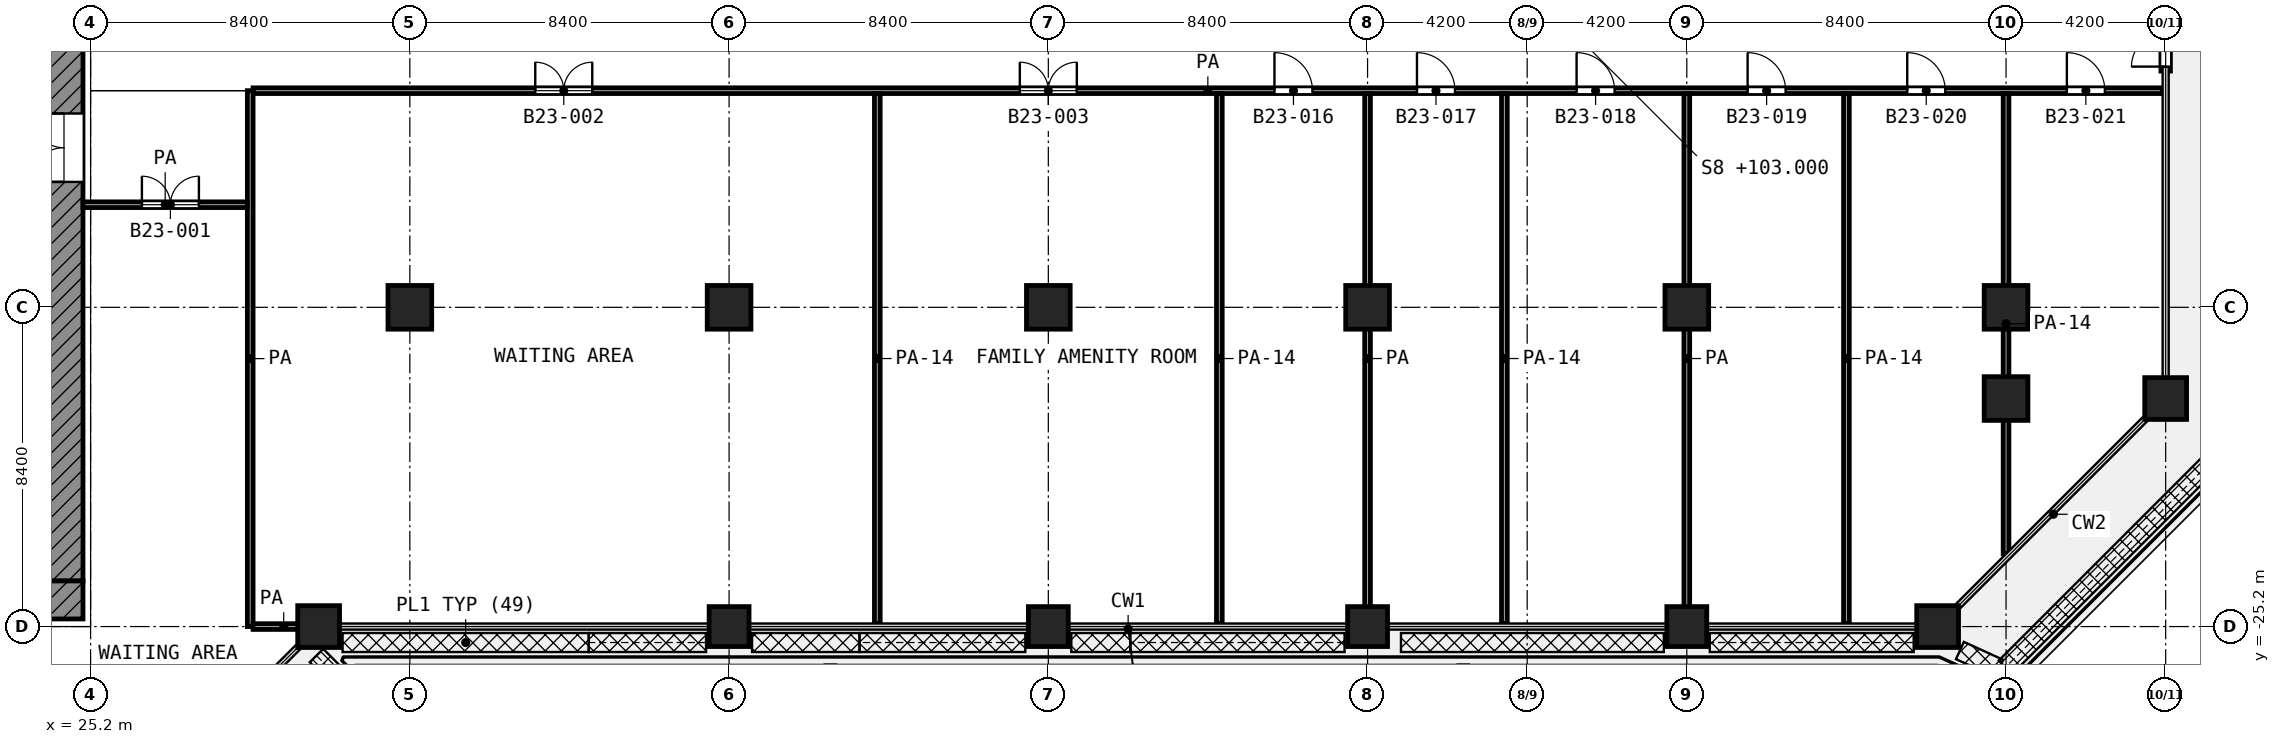
"""IFC4 building model, lengths in metres.
Left out: names, types, materials, properties, quantities, classifications, styles, units other than length and angle.
Written with IfcOpenShell. Run it as: python <this file> out.ifc"""

import sys

from ifc_helpers import new_model, si_unit, direction, frame, frame_2d, origin, origin_2d, place, context, subcontext, project, spatial, rectangle, extrude, element, fill, save


model = new_model("IFC4")
c1 = context("Model", 3, precision=1e-05, world=origin(), true_north=direction((0.0, 1.0)))
c2 = subcontext(c1, "Body", "Model", "MODEL_VIEW")
j1 = project(units=[si_unit("LENGTHUNIT", "METRE"), si_unit("PLANEANGLEUNIT", "RADIAN")], contexts=[c1])
p1 = place(None, origin())
s1 = spatial("IfcSite", under=j1, at=p1, CompositionType="ELEMENT")
p2 = place(p1, origin())
s2 = spatial("IfcBuilding", under=s1, at=p2, CompositionType="ELEMENT")
p3 = place(p2, frame((0.0, 0.0, 103.0)))
s3 = spatial("IfcBuildingStorey", under=s2, at=p3, CompositionType="ELEMENT", Elevation=103.0)
for number, where, z_axis, x_axis in (
    (1, (33.6, -16.8, 0.0), (0.0, 0.0, 1.0), (1.0, 0.0, 0.0)),
    (2, (42.0, -16.8, 0.0), (0.0, 0.0, 1.0), (1.0, 0.0, 0.0)),
    (3, (50.4, -16.8, 0.0), (0.0, 0.0, 1.0), (1.0, 0.0, 0.0)),
    (4, (58.8, -16.8, 0.0), (0.0, 0.0, 1.0), (1.0, 0.0, 0.0)),
    (5, (67.2, -16.8, 0.0), (0.0, 0.0, 1.0), (1.0, 0.0, 0.0)),
    (6, (75.6, -16.8, 0.0), (0.0, 0.0, 1.0), (1.0, 0.0, 0.0)),
    (7, (75.6, -19.2, 0.0), (0.0, 0.0, 1.0), (1.0, 0.0, 0.0)),
):
    element("IfcColumn", number, at=place(p3, frame(where, z_axis=z_axis, x_axis=x_axis)), inside=s3, PredefinedType="COLUMN", context=c2, shape_type="SweptSolid", body=[
        extrude(rectangle(XDim=1.15, YDim=1.15, at=origin_2d()), origin(), (0.0, 0.0, 1.0), 4.2),
    ])
for number, where, z_axis, x_axis in (
    (8, (79.8, -19.2, 0.0), (0.0, 0.0, 1.0), (1.0, 0.0, 0.0)),
    (9, (31.2, -25.2, 0.0), (0.0, 0.0, 1.0), (1.0, 0.0, 0.0)),
):
    element("IfcColumn", number, at=place(p3, frame(where, z_axis=z_axis, x_axis=x_axis)), inside=s3, PredefinedType="COLUMN", context=c2, shape_type="SweptSolid", body=[
        extrude(rectangle(XDim=1.1, YDim=1.1, at=origin_2d()), origin(), (0.0, 0.0, 1.0), 4.2),
    ])
for number, where, z_axis, x_axis in (
    (10, (42.0, -25.2, 0.0), (0.0, 0.0, 1.0), (1.0, 0.0, 0.0)),
    (11, (50.4, -25.2, 0.0), (0.0, 0.0, 1.0), (1.0, 0.0, 0.0)),
    (12, (58.8, -25.2, 0.0), (0.0, 0.0, 1.0), (1.0, 0.0, 0.0)),
    (13, (67.2, -25.2, 0.0), (0.0, 0.0, 1.0), (1.0, 0.0, 0.0)),
):
    element("IfcColumn", number, at=place(p3, frame(where, z_axis=z_axis, x_axis=x_axis)), inside=s3, PredefinedType="COLUMN", context=c2, shape_type="SweptSolid", body=[
        extrude(rectangle(XDim=1.05, YDim=1.05, at=origin_2d()), origin(), (0.0, 0.0, 1.0), 4.2),
    ])
p4 = place(p3, frame((73.8, -25.2, 0.0), z_axis=(0.0, 0.0, 1.0), x_axis=(1.0, 0.0, 0.0)))
e14 = element("IfcColumn", 14, at=p4, inside=s3, PredefinedType="COLUMN", context=c2, shape_type="SweptSolid", body=[
    extrude(rectangle(XDim=1.1, YDim=1.1, at=origin_2d()), origin(), (0.0, 0.0, 1.0), 4.2),
])
p5 = place(p3, frame((79.8, -10.583, 0.0), z_axis=(0.0, 0.0, 1.0), x_axis=(0.0, 1.0, 0.0)))
e15 = element("IfcWall", 15, at=p5, inside=s3, PredefinedType="SOLIDWALL", context=c2, shape_type="SweptSolid", body=[
    extrude(rectangle(XDim=4.033, YDim=0.25, at=frame_2d((2.017, 0.0))), origin(), (0.0, 0.0, 1.0), 3.48),
])
p6 = place(p5, frame((0.117, 0.0, 0.0)))
e16 = element("IfcOpeningElement", 16, at=p6, cuts=e15, PredefinedType="OPENING", context=c2, shape_type="SweptSolid", body=[
    extrude(rectangle(XDim=1.8, YDim=2.1, at=frame_2d((0.9, 1.05))), frame((0.0, 0.135, 0.0), z_axis=(0.0, -1.0, 0.0), x_axis=(1.0, 0.0, 0.0)), (0.0, 0.0, 1.0), 0.27),
])
p7 = place(p3, frame((24.5, -24.0, 0.0), z_axis=(0.0, 0.0, 1.0), x_axis=(0.0, 1.0, 0.0)))
e17 = element("IfcWall", 17, at=p7, inside=s3, PredefinedType="SHEAR", context=c2, shape_type="SweptSolid", body=[
    extrude(rectangle(XDim=18.6, YDim=1.0, at=frame_2d((9.3, 0.0))), origin(), (0.0, 0.0, 1.0), 3.6),
])
p8 = place(p7, frame((10.5, 0.0, 0.0)))
e18 = element("IfcOpeningElement", 18, at=p8, cuts=e17, PredefinedType="OPENING", context=c2, shape_type="SweptSolid", body=[
    extrude(rectangle(XDim=1.8, YDim=2.1, at=frame_2d((0.9, 1.05))), frame((0.0, 0.51, 0.0), z_axis=(0.0, -1.0, 0.0), x_axis=(1.0, 0.0, 0.0)), (0.0, 0.0, 1.0), 1.02),
])
p9 = place(p3, frame((24.5, -25.0, 0.0), z_axis=(0.0, 0.0, 1.0), x_axis=(0.0, 1.0, 0.0)))
e19 = element("IfcWall", 19, at=p9, inside=s3, PredefinedType="SHEAR", context=c2, shape_type="SweptSolid", body=[
    extrude(rectangle(XDim=1.0, YDim=1.0, at=frame_2d((0.5, 0.0))), origin(), (0.0, 0.0, 1.0), 3.6),
])
p10 = place(p3, frame((29.475, -25.2, 0.0), z_axis=(0.0, 0.0, 1.0), x_axis=(1.0, 0.0, 0.0)))
e20 = element("IfcWall", 20, at=p10, inside=s3, PredefinedType="PARTITIONING", context=c2, shape_type="SweptSolid", body=[
    extrude(rectangle(XDim=1.612, YDim=0.15, at=frame_2d((0.806, 0.0))), origin(), (0.0, 0.0, 1.0), 3.6),
])
p11 = place(p3, frame((25.0, -14.1, 0.0), z_axis=(0.0, 0.0, 1.0), x_axis=(1.0, 0.0, 0.0)))
e21 = element("IfcWall", 21, at=p11, inside=s3, PredefinedType="PARTITIONING", context=c2, shape_type="SweptSolid", body=[
    extrude(rectangle(XDim=4.325, YDim=0.15, at=frame_2d((2.163, 0.0))), origin(), (0.0, 0.0, 1.0), 3.6),
])
p12 = place(p11, frame((1.55, 0.0, 0.0)))
e22 = element("IfcOpeningElement", 22, at=p12, cuts=e21, PredefinedType="OPENING", context=c2, shape_type="SweptSolid", body=[
    extrude(rectangle(XDim=1.5, YDim=2.1, at=frame_2d((0.75, 1.05))), frame((0.0, 0.085, 0.0), z_axis=(0.0, -1.0, 0.0), x_axis=(1.0, 0.0, 0.0)), (0.0, 0.0, 1.0), 0.17),
])
p13 = place(p3, frame((29.475, -11.1, 0.0), z_axis=(0.0, 0.0, 1.0), x_axis=(1.0, 0.0, 0.0)))
e23 = element("IfcWall", 23, at=p13, inside=s3, PredefinedType="PARTITIONING", context=c2, shape_type="SweptSolid", body=[
    extrude(rectangle(XDim=50.245, YDim=0.15, at=frame_2d((25.123, 0.0))), origin(), (0.0, 0.0, 1.0), 3.6),
])
p14 = place(p13, frame((7.425, 0.0, 0.0)))
e24 = element("IfcOpeningElement", 24, at=p14, cuts=e23, PredefinedType="OPENING", context=c2, shape_type="SweptSolid", body=[
    extrude(rectangle(XDim=1.5, YDim=2.1, at=frame_2d((0.75, 1.05))), frame((0.0, 0.085, 0.0), z_axis=(0.0, -1.0, 0.0), x_axis=(1.0, 0.0, 0.0)), (0.0, 0.0, 1.0), 0.17),
])
p15 = place(p13, frame((20.175, 0.0, 0.0)))
e25 = element("IfcOpeningElement", 25, at=p15, cuts=e23, PredefinedType="OPENING", context=c2, shape_type="SweptSolid", body=[
    extrude(rectangle(XDim=1.5, YDim=2.1, at=frame_2d((0.75, 1.05))), frame((0.0, 0.085, 0.0), z_axis=(0.0, -1.0, 0.0), x_axis=(1.0, 0.0, 0.0)), (0.0, 0.0, 1.0), 0.17),
])
p16 = place(p13, frame((26.875, 0.0, 0.0)))
e26 = element("IfcOpeningElement", 26, at=p16, cuts=e23, PredefinedType="OPENING", context=c2, shape_type="SweptSolid", body=[
    extrude(rectangle(XDim=1.0, YDim=2.1, at=frame_2d((0.5, 1.05))), frame((0.0, 0.085, 0.0), z_axis=(0.0, -1.0, 0.0), x_axis=(1.0, 0.0, 0.0)), (0.0, 0.0, 1.0), 0.17),
])
p17 = place(p13, frame((30.625, 0.0, 0.0)))
e27 = element("IfcOpeningElement", 27, at=p17, cuts=e23, PredefinedType="OPENING", context=c2, shape_type="SweptSolid", body=[
    extrude(rectangle(XDim=1.0, YDim=2.1, at=frame_2d((0.5, 1.05))), frame((0.0, 0.085, 0.0), z_axis=(0.0, -1.0, 0.0), x_axis=(1.0, 0.0, 0.0)), (0.0, 0.0, 1.0), 0.17),
])
p18 = place(p13, frame((34.825, 0.0, 0.0)))
e28 = element("IfcOpeningElement", 28, at=p18, cuts=e23, PredefinedType="OPENING", context=c2, shape_type="SweptSolid", body=[
    extrude(rectangle(XDim=1.0, YDim=2.1, at=frame_2d((0.5, 1.05))), frame((0.0, 0.085, 0.0), z_axis=(0.0, -1.0, 0.0), x_axis=(1.0, 0.0, 0.0)), (0.0, 0.0, 1.0), 0.17),
])
p19 = place(p13, frame((39.325, 0.0, 0.0)))
e29 = element("IfcOpeningElement", 29, at=p19, cuts=e23, PredefinedType="OPENING", context=c2, shape_type="SweptSolid", body=[
    extrude(rectangle(XDim=1.0, YDim=2.1, at=frame_2d((0.5, 1.05))), frame((0.0, 0.085, 0.0), z_axis=(0.0, -1.0, 0.0), x_axis=(1.0, 0.0, 0.0)), (0.0, 0.0, 1.0), 0.17),
])
p20 = place(p13, frame((43.525, 0.0, 0.0)))
e30 = element("IfcOpeningElement", 30, at=p20, cuts=e23, PredefinedType="OPENING", context=c2, shape_type="SweptSolid", body=[
    extrude(rectangle(XDim=1.0, YDim=2.1, at=frame_2d((0.5, 1.05))), frame((0.0, 0.085, 0.0), z_axis=(0.0, -1.0, 0.0), x_axis=(1.0, 0.0, 0.0)), (0.0, 0.0, 1.0), 0.17),
])
p21 = place(p13, frame((47.725, 0.0, 0.0)))
e31 = element("IfcOpeningElement", 31, at=p21, cuts=e23, PredefinedType="OPENING", context=c2, shape_type="SweptSolid", body=[
    extrude(rectangle(XDim=1.0, YDim=2.1, at=frame_2d((0.5, 1.05))), frame((0.0, 0.085, 0.0), z_axis=(0.0, -1.0, 0.0), x_axis=(1.0, 0.0, 0.0)), (0.0, 0.0, 1.0), 0.17),
])
p22 = place(p3, frame((29.4, -25.2, 0.0), z_axis=(0.0, 0.0, 1.0), x_axis=(0.0, 1.0, 0.0)))
e32 = element("IfcWall", 32, at=p22, inside=s3, PredefinedType="PARTITIONING", context=c2, shape_type="SweptSolid", body=[
    extrude(rectangle(XDim=14.1, YDim=0.15, at=frame_2d((7.05, 0.0))), origin(), (0.0, 0.0, 1.0), 3.6),
])
for number, where, z_axis, x_axis in (
    (33, (45.9, -25.12, 0.0), (0.0, 0.0, 1.0), (0.0, 1.0, 0.0)),
    (34, (54.9, -25.12, 0.0), (0.0, 0.0, 1.0), (0.0, 1.0, 0.0)),
):
    element("IfcWall", number, at=place(p3, frame(where, z_axis=z_axis, x_axis=x_axis)), inside=s3, PredefinedType="PARTITIONING", context=c2, shape_type="SweptSolid", body=[
        extrude(rectangle(XDim=13.945, YDim=0.15, at=frame_2d((6.973, 0.0))), origin(), (0.0, 0.0, 1.0), 2.7),
    ])
p23 = place(p3, frame((58.8, -25.12, 0.0), z_axis=(0.0, 0.0, 1.0), x_axis=(0.0, 1.0, 0.0)))
e35 = element("IfcWall", 35, at=p23, inside=s3, PredefinedType="PARTITIONING", context=c2, shape_type="SweptSolid", body=[
    extrude(rectangle(XDim=13.945, YDim=0.15, at=frame_2d((6.973, 0.0))), origin(), (0.0, 0.0, 1.0), 3.6),
])
p24 = place(p3, frame((62.4, -25.12, 0.0), z_axis=(0.0, 0.0, 1.0), x_axis=(0.0, 1.0, 0.0)))
e36 = element("IfcWall", 36, at=p24, inside=s3, PredefinedType="PARTITIONING", context=c2, shape_type="SweptSolid", body=[
    extrude(rectangle(XDim=13.945, YDim=0.15, at=frame_2d((6.973, 0.0))), origin(), (0.0, 0.0, 1.0), 2.7),
])
p25 = place(p3, frame((67.2, -25.12, 0.0), z_axis=(0.0, 0.0, 1.0), x_axis=(0.0, 1.0, 0.0)))
e37 = element("IfcWall", 37, at=p25, inside=s3, PredefinedType="PARTITIONING", context=c2, shape_type="SweptSolid", body=[
    extrude(rectangle(XDim=13.945, YDim=0.15, at=frame_2d((6.973, 0.0))), origin(), (0.0, 0.0, 1.0), 3.6),
])
p26 = place(p3, frame((71.4, -25.12, 0.0), z_axis=(0.0, 0.0, 1.0), x_axis=(0.0, 1.0, 0.0)))
e38 = element("IfcWall", 38, at=p26, inside=s3, PredefinedType="PARTITIONING", context=c2, shape_type="SweptSolid", body=[
    extrude(rectangle(XDim=13.945, YDim=0.15, at=frame_2d((6.973, 0.0))), origin(), (0.0, 0.0, 1.0), 2.7),
])
p27 = place(p3, frame((75.6, -23.287, 0.0), z_axis=(0.0, 0.0, 1.0), x_axis=(0.0, 1.0, 0.0)))
e39 = element("IfcWall", 39, at=p27, inside=s3, PredefinedType="PARTITIONING", context=c2, shape_type="SweptSolid", body=[
    extrude(rectangle(XDim=12.112, YDim=0.15, at=frame_2d((6.056, 0.0))), origin(), (0.0, 0.0, 1.0), 2.7),
])
p28 = place(p6, origin())
e40 = element("IfcDoor", 40, at=p28, inside=s3, OperationType="DOUBLE_DOOR_SINGLE_SWING", PredefinedType="DOOR", context=c2, shape_type="SweptSolid", body=[
    extrude(rectangle(XDim=1.8, YDim=2.1, at=frame_2d((0.9, 1.05))), frame((0.0, 0.025, 0.0), z_axis=(0.0, -1.0, 0.0), x_axis=(1.0, 0.0, 0.0)), (0.0, 0.0, 1.0), 0.05),
])
fill(e16, e40)
p29 = place(p8, origin())
e41 = element("IfcDoor", 41, at=p29, inside=s3, OperationType="DOUBLE_DOOR_SINGLE_SWING", PredefinedType="DOOR", context=c2, shape_type="SweptSolid", body=[
    extrude(rectangle(XDim=1.8, YDim=2.1, at=frame_2d((0.9, 1.05))), frame((0.0, 0.025, 0.0), z_axis=(0.0, -1.0, 0.0), x_axis=(1.0, 0.0, 0.0)), (0.0, 0.0, 1.0), 0.05),
])
fill(e18, e41)
p30 = place(p12, origin())
e42 = element("IfcDoor", 42, at=p30, inside=s3, OperationType="DOUBLE_DOOR_SINGLE_SWING", PredefinedType="DOOR", context=c2, shape_type="SweptSolid", body=[
    extrude(rectangle(XDim=1.5, YDim=2.1, at=frame_2d((0.75, 1.05))), frame((0.0, 0.025, 0.0), z_axis=(0.0, -1.0, 0.0), x_axis=(1.0, 0.0, 0.0)), (0.0, 0.0, 1.0), 0.05),
])
fill(e22, e42)
p31 = place(p14, origin())
e43 = element("IfcDoor", 43, at=p31, inside=s3, OperationType="DOUBLE_DOOR_SINGLE_SWING", PredefinedType="DOOR", context=c2, shape_type="SweptSolid", body=[
    extrude(rectangle(XDim=1.5, YDim=2.1, at=frame_2d((0.75, 1.05))), frame((0.0, 0.025, 0.0), z_axis=(0.0, -1.0, 0.0), x_axis=(1.0, 0.0, 0.0)), (0.0, 0.0, 1.0), 0.05),
])
fill(e24, e43)
p32 = place(p15, origin())
e44 = element("IfcDoor", 44, at=p32, inside=s3, OperationType="DOUBLE_DOOR_SINGLE_SWING", PredefinedType="DOOR", context=c2, shape_type="SweptSolid", body=[
    extrude(rectangle(XDim=1.5, YDim=2.1, at=frame_2d((0.75, 1.05))), frame((0.0, 0.025, 0.0), z_axis=(0.0, -1.0, 0.0), x_axis=(1.0, 0.0, 0.0)), (0.0, 0.0, 1.0), 0.05),
])
fill(e25, e44)
p33 = place(p16, origin())
e45 = element("IfcDoor", 45, at=p33, inside=s3, OperationType="SINGLE_SWING_LEFT", PredefinedType="DOOR", context=c2, shape_type="SweptSolid", body=[
    extrude(rectangle(XDim=1.0, YDim=2.1, at=frame_2d((0.5, 1.05))), frame((0.0, 0.025, 0.0), z_axis=(0.0, -1.0, 0.0), x_axis=(1.0, 0.0, 0.0)), (0.0, 0.0, 1.0), 0.05),
])
fill(e26, e45)
p34 = place(p17, origin())
e46 = element("IfcDoor", 46, at=p34, inside=s3, OperationType="SINGLE_SWING_LEFT", PredefinedType="DOOR", context=c2, shape_type="SweptSolid", body=[
    extrude(rectangle(XDim=1.0, YDim=2.1, at=frame_2d((0.5, 1.05))), frame((0.0, 0.025, 0.0), z_axis=(0.0, -1.0, 0.0), x_axis=(1.0, 0.0, 0.0)), (0.0, 0.0, 1.0), 0.05),
])
fill(e27, e46)
p35 = place(p18, origin())
e47 = element("IfcDoor", 47, at=p35, inside=s3, OperationType="SINGLE_SWING_LEFT", PredefinedType="DOOR", context=c2, shape_type="SweptSolid", body=[
    extrude(rectangle(XDim=1.0, YDim=2.1, at=frame_2d((0.5, 1.05))), frame((0.0, 0.025, 0.0), z_axis=(0.0, -1.0, 0.0), x_axis=(1.0, 0.0, 0.0)), (0.0, 0.0, 1.0), 0.05),
])
fill(e28, e47)
p36 = place(p19, origin())
e48 = element("IfcDoor", 48, at=p36, inside=s3, OperationType="SINGLE_SWING_LEFT", PredefinedType="DOOR", context=c2, shape_type="SweptSolid", body=[
    extrude(rectangle(XDim=1.0, YDim=2.1, at=frame_2d((0.5, 1.05))), frame((0.0, 0.025, 0.0), z_axis=(0.0, -1.0, 0.0), x_axis=(1.0, 0.0, 0.0)), (0.0, 0.0, 1.0), 0.05),
])
fill(e29, e48)
p37 = place(p20, origin())
e49 = element("IfcDoor", 49, at=p37, inside=s3, OperationType="SINGLE_SWING_LEFT", PredefinedType="DOOR", context=c2, shape_type="SweptSolid", body=[
    extrude(rectangle(XDim=1.0, YDim=2.1, at=frame_2d((0.5, 1.05))), frame((0.0, 0.025, 0.0), z_axis=(0.0, -1.0, 0.0), x_axis=(1.0, 0.0, 0.0)), (0.0, 0.0, 1.0), 0.05),
])
fill(e30, e49)
p38 = place(p21, origin())
e50 = element("IfcDoor", 50, at=p38, inside=s3, OperationType="SINGLE_SWING_LEFT", PredefinedType="DOOR", context=c2, shape_type="SweptSolid", body=[
    extrude(rectangle(XDim=1.0, YDim=2.1, at=frame_2d((0.5, 1.05))), frame((0.0, 0.025, 0.0), z_axis=(0.0, -1.0, 0.0), x_axis=(1.0, 0.0, 0.0)), (0.0, 0.0, 1.0), 0.05),
])
fill(e31, e50)
save(model, sys.argv[1])
